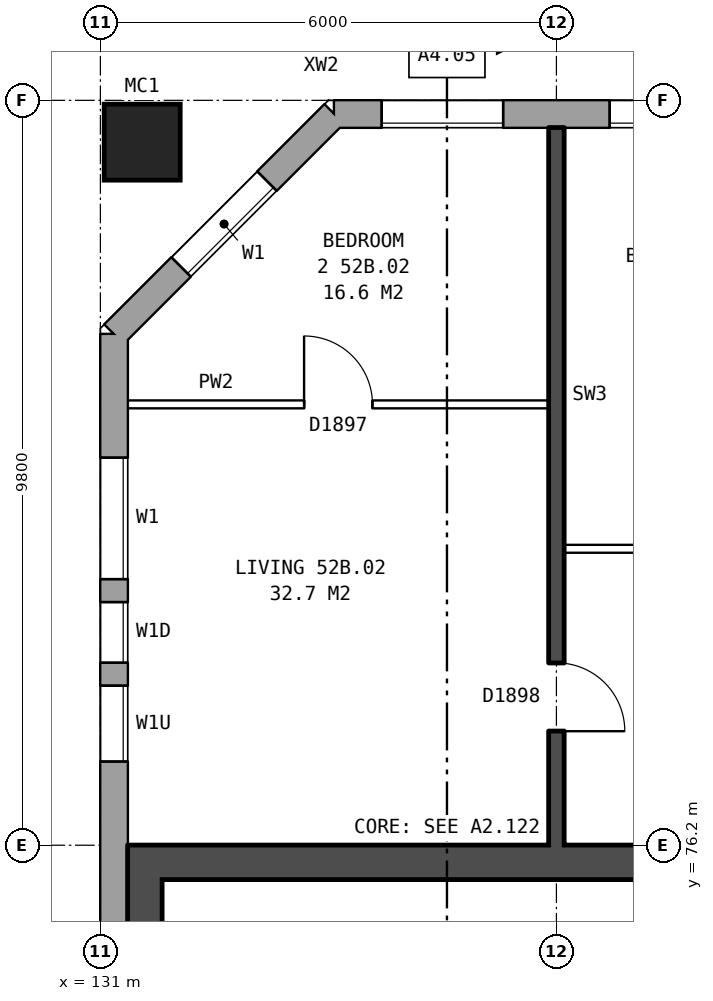
"""IFC4 building model, lengths in metres.
Left out: names, types, materials, properties, quantities, classifications, styles, units other than length and angle.
Written with IfcOpenShell. Run it as: python <this file> out.ifc"""

import sys

from ifc_helpers import new_model, si_unit, direction, frame, frame_2d, origin, origin_2d, place, context, subcontext, project, spatial, rectangle, hollow_rectangle, extrude, element, fill, save


model = new_model("IFC4")
c1 = context("Model", 3, precision=1e-05, world=origin(), true_north=direction((0.0, 1.0)))
c2 = subcontext(c1, "Body", "Model", "MODEL_VIEW")
j1 = project(units=[si_unit("LENGTHUNIT", "METRE"), si_unit("PLANEANGLEUNIT", "RADIAN")], contexts=[c1])
p1 = place(None, origin())
s1 = spatial("IfcSite", under=j1, at=p1, CompositionType="ELEMENT")
p2 = place(p1, origin())
s2 = spatial("IfcBuilding", under=s1, at=p2, CompositionType="ELEMENT")
p3 = place(p2, frame((0.0, 0.0, 185.1)))
s3 = spatial("IfcBuildingStorey", under=s2, at=p3, CompositionType="ELEMENT", Elevation=185.1)
p4 = place(p3, frame((131.55, 85.45, 0.0), z_axis=(0.0, 0.0, 1.0), x_axis=(1.0, 0.0, 0.0)))
e1 = element("IfcColumn", 1, at=p4, inside=s3, PredefinedType="COLUMN", context=c2, shape_type="SweptSolid", body=[
    extrude(hollow_rectangle(XDim=1.0, YDim=1.0, WallThickness=0.055, at=origin_2d()), origin(), (0.0, 0.0, 1.0), 3.1),
])
p5 = place(p3, frame((167.175, 85.82, 0.0), z_axis=(0.0, 0.0, 1.0), x_axis=(-1.0, 0.0, 0.0)))
e2 = element("IfcWall", 2, at=p5, inside=s3, PredefinedType="STANDARD", context=c2, shape_type="SweptSolid", body=[
    extrude(rectangle(XDim=33.101, YDim=0.36, at=frame_2d((16.55, 0.0))), origin(), (0.0, 0.0, 1.0), 2.85),
])
p6 = place(p5, frame((0.875, 0.0, 0.8)))
e3 = element("IfcOpeningElement", 3, at=p6, cuts=e2, PredefinedType="OPENING", context=c2, shape_type="SweptSolid", body=[
    extrude(rectangle(XDim=1.6, YDim=1.8, at=frame_2d((0.8, 0.9))), frame((0.0, 0.19, 0.0), z_axis=(0.0, -1.0, 0.0), x_axis=(1.0, 0.0, 0.0)), (0.0, 0.0, 1.0), 0.38),
])
p7 = place(p5, frame((3.875, 0.0, 0.8)))
e4 = element("IfcOpeningElement", 4, at=p7, cuts=e2, PredefinedType="OPENING", context=c2, shape_type="SweptSolid", body=[
    extrude(rectangle(XDim=1.6, YDim=1.8, at=frame_2d((0.8, 0.9))), frame((0.0, 0.19, 0.0), z_axis=(0.0, -1.0, 0.0), x_axis=(1.0, 0.0, 0.0)), (0.0, 0.0, 1.0), 0.38),
])
p8 = place(p5, frame((6.875, 0.0, 0.8)))
e5 = element("IfcOpeningElement", 5, at=p8, cuts=e2, PredefinedType="OPENING", context=c2, shape_type="SweptSolid", body=[
    extrude(rectangle(XDim=1.6, YDim=1.8, at=frame_2d((0.8, 0.9))), frame((0.0, 0.19, 0.0), z_axis=(0.0, -1.0, 0.0), x_axis=(1.0, 0.0, 0.0)), (0.0, 0.0, 1.0), 0.38),
])
p9 = place(p5, frame((8.775, 0.0, 1.4)))
e6 = element("IfcOpeningElement", 6, at=p9, cuts=e2, PredefinedType="OPENING", context=c2, shape_type="SweptSolid", body=[
    extrude(rectangle(XDim=0.8, YDim=1.2, at=frame_2d((0.4, 0.6))), frame((0.0, 0.19, 0.0), z_axis=(0.0, -1.0, 0.0), x_axis=(1.0, 0.0, 0.0)), (0.0, 0.0, 1.0), 0.38),
])
p10 = place(p5, frame((12.875, 0.0, 0.8)))
e7 = element("IfcOpeningElement", 7, at=p10, cuts=e2, PredefinedType="OPENING", context=c2, shape_type="SweptSolid", body=[
    extrude(rectangle(XDim=1.6, YDim=1.8, at=frame_2d((0.8, 0.9))), frame((0.0, 0.19, 0.0), z_axis=(0.0, -1.0, 0.0), x_axis=(1.0, 0.0, 0.0)), (0.0, 0.0, 1.0), 0.38),
])
p11 = place(p5, frame((15.875, 0.0, 0.8)))
e8 = element("IfcOpeningElement", 8, at=p11, cuts=e2, PredefinedType="OPENING", context=c2, shape_type="SweptSolid", body=[
    extrude(rectangle(XDim=1.6, YDim=1.8, at=frame_2d((0.8, 0.9))), frame((0.0, 0.19, 0.0), z_axis=(0.0, -1.0, 0.0), x_axis=(1.0, 0.0, 0.0)), (0.0, 0.0, 1.0), 0.38),
])
p12 = place(p5, frame((18.875, 0.0, 0.8)))
e9 = element("IfcOpeningElement", 9, at=p12, cuts=e2, PredefinedType="OPENING", context=c2, shape_type="SweptSolid", body=[
    extrude(rectangle(XDim=1.6, YDim=1.8, at=frame_2d((0.8, 0.9))), frame((0.0, 0.19, 0.0), z_axis=(0.0, -1.0, 0.0), x_axis=(1.0, 0.0, 0.0)), (0.0, 0.0, 1.0), 0.38),
])
p13 = place(p5, frame((21.325, 0.0, 0.25)))
e10 = element("IfcOpeningElement", 10, at=p13, cuts=e2, PredefinedType="OPENING", context=c2, shape_type="SweptSolid", body=[
    extrude(rectangle(XDim=0.6, YDim=1.8, at=frame_2d((0.3, 0.9))), frame((0.0, 0.19, 0.0), z_axis=(0.0, -1.0, 0.0), x_axis=(1.0, 0.0, 0.0)), (0.0, 0.0, 1.0), 0.38),
])
p14 = place(p5, frame((24.875, 0.0, 0.8)))
e11 = element("IfcOpeningElement", 11, at=p14, cuts=e2, PredefinedType="OPENING", context=c2, shape_type="SweptSolid", body=[
    extrude(rectangle(XDim=1.6, YDim=1.8, at=frame_2d((0.8, 0.9))), frame((0.0, 0.19, 0.0), z_axis=(0.0, -1.0, 0.0), x_axis=(1.0, 0.0, 0.0)), (0.0, 0.0, 1.0), 0.38),
])
p15 = place(p5, frame((27.875, 0.0, 0.8)))
e12 = element("IfcOpeningElement", 12, at=p15, cuts=e2, PredefinedType="OPENING", context=c2, shape_type="SweptSolid", body=[
    extrude(rectangle(XDim=1.6, YDim=1.8, at=frame_2d((0.8, 0.9))), frame((0.0, 0.19, 0.0), z_axis=(0.0, -1.0, 0.0), x_axis=(1.0, 0.0, 0.0)), (0.0, 0.0, 1.0), 0.38),
])
p16 = place(p5, frame((30.875, 0.0, 0.8)))
e13 = element("IfcOpeningElement", 13, at=p16, cuts=e2, PredefinedType="OPENING", context=c2, shape_type="SweptSolid", body=[
    extrude(rectangle(XDim=1.6, YDim=1.8, at=frame_2d((0.8, 0.9))), frame((0.0, 0.19, 0.0), z_axis=(0.0, -1.0, 0.0), x_axis=(1.0, 0.0, 0.0)), (0.0, 0.0, 1.0), 0.38),
])
p17 = place(p5, frame((11.125, 0.0, 0.8)))
e14 = element("IfcOpeningElement", 14, at=p17, cuts=e2, PredefinedType="OPENING", context=c2, shape_type="SweptSolid", body=[
    extrude(rectangle(XDim=0.8, YDim=1.2, at=frame_2d((0.4, 0.6))), frame((0.0, 0.19, 0.0), z_axis=(0.0, -1.0, 0.0), x_axis=(1.0, 0.0, 0.0)), (0.0, 0.0, 1.0), 0.38),
])
p18 = place(p5, frame((22.225, 0.0, 0.15)))
e15 = element("IfcOpeningElement", 15, at=p18, cuts=e2, PredefinedType="OPENING", context=c2, shape_type="SweptSolid", body=[
    extrude(rectangle(XDim=0.6, YDim=0.9, at=frame_2d((0.3, 0.45))), frame((0.0, 0.19, 0.0), z_axis=(0.0, -1.0, 0.0), x_axis=(1.0, 0.0, 0.0)), (0.0, 0.0, 1.0), 0.38),
])
p19 = place(p5, frame((23.325, 0.0, 1.65)))
e16 = element("IfcOpeningElement", 16, at=p19, cuts=e2, PredefinedType="OPENING", context=c2, shape_type="SweptSolid", body=[
    extrude(rectangle(XDim=0.6, YDim=0.9, at=frame_2d((0.3, 0.45))), frame((0.0, 0.19, 0.0), z_axis=(0.0, -1.0, 0.0), x_axis=(1.0, 0.0, 0.0)), (0.0, 0.0, 1.0), 0.38),
])
p20 = place(p3, frame((134.075, 85.82, 0.0), z_axis=(0.0, 0.0, 1.0), x_axis=(-0.707106781187, -0.707106781187, 0.0)))
e17 = element("IfcWall", 17, at=p20, inside=s3, PredefinedType="STANDARD", context=c2, shape_type="SweptSolid", body=[
    extrude(rectangle(XDim=4.094, YDim=0.36, at=frame_2d((2.047, 0.0))), origin(), (0.0, 0.0, 1.0), 2.85),
])
p21 = place(p20, frame((1.247, 0.0, 0.8)))
e18 = element("IfcOpeningElement", 18, at=p21, cuts=e17, PredefinedType="OPENING", context=c2, shape_type="SweptSolid", body=[
    extrude(rectangle(XDim=1.6, YDim=1.8, at=frame_2d((0.8, 0.9))), frame((0.0, 0.19, 0.0), z_axis=(0.0, -1.0, 0.0), x_axis=(1.0, 0.0, 0.0)), (0.0, 0.0, 1.0), 0.38),
])
p22 = place(p3, frame((131.18, 82.925, 0.0), z_axis=(0.0, 0.0, 1.0), x_axis=(0.0, -1.0, 0.0)))
e19 = element("IfcWall", 19, at=p22, inside=s3, PredefinedType="STANDARD", context=c2, shape_type="SweptSolid", body=[
    extrude(rectangle(XDim=25.851, YDim=0.36, at=frame_2d((12.925, 0.0))), origin(), (0.0, 0.0, 1.0), 2.85),
])
p23 = place(p22, frame((1.625, 0.0, 0.8)))
e20 = element("IfcOpeningElement", 20, at=p23, cuts=e19, PredefinedType="OPENING", context=c2, shape_type="SweptSolid", body=[
    extrude(rectangle(XDim=1.6, YDim=1.8, at=frame_2d((0.8, 0.9))), frame((0.0, 0.19, 0.0), z_axis=(0.0, -1.0, 0.0), x_axis=(1.0, 0.0, 0.0)), (0.0, 0.0, 1.0), 0.38),
])
p24 = place(p22, frame((3.525, 0.0, 0.8)))
e21 = element("IfcOpeningElement", 21, at=p24, cuts=e19, PredefinedType="OPENING", context=c2, shape_type="SweptSolid", body=[
    extrude(rectangle(XDim=0.8, YDim=1.8, at=frame_2d((0.4, 0.9))), frame((0.0, 0.19, 0.0), z_axis=(0.0, -1.0, 0.0), x_axis=(1.0, 0.0, 0.0)), (0.0, 0.0, 1.0), 0.38),
])
p25 = place(p22, frame((20.2, 0.0, 0.8)))
e22 = element("IfcOpeningElement", 22, at=p25, cuts=e19, PredefinedType="OPENING", context=c2, shape_type="SweptSolid", body=[
    extrude(rectangle(XDim=0.6, YDim=0.9, at=frame_2d((0.3, 0.45))), frame((0.0, 0.19, 0.0), z_axis=(0.0, -1.0, 0.0), x_axis=(1.0, 0.0, 0.0)), (0.0, 0.0, 1.0), 0.38),
])
p26 = place(p22, frame((22.625, 0.0, 0.8)))
e23 = element("IfcOpeningElement", 23, at=p26, cuts=e19, PredefinedType="OPENING", context=c2, shape_type="SweptSolid", body=[
    extrude(rectangle(XDim=1.6, YDim=1.8, at=frame_2d((0.8, 0.9))), frame((0.0, 0.19, 0.0), z_axis=(0.0, -1.0, 0.0), x_axis=(1.0, 0.0, 0.0)), (0.0, 0.0, 1.0), 0.38),
])
p27 = place(p22, frame((4.625, 0.0, 0.8)))
e24 = element("IfcOpeningElement", 24, at=p27, cuts=e19, PredefinedType="OPENING", context=c2, shape_type="SweptSolid", body=[
    extrude(rectangle(XDim=1.0, YDim=0.9, at=frame_2d((0.5, 0.45))), frame((0.0, 0.19, 0.0), z_axis=(0.0, -1.0, 0.0), x_axis=(1.0, 0.0, 0.0)), (0.0, 0.0, 1.0), 0.38),
])
p28 = place(p22, frame((21.1, 0.0, 0.8)))
e25 = element("IfcOpeningElement", 25, at=p28, cuts=e19, PredefinedType="OPENING", context=c2, shape_type="SweptSolid", body=[
    extrude(rectangle(XDim=1.2, YDim=1.5, at=frame_2d((0.6, 0.75))), frame((0.0, 0.19, 0.0), z_axis=(0.0, -1.0, 0.0), x_axis=(1.0, 0.0, 0.0)), (0.0, 0.0, 1.0), 0.38),
])
p29 = place(p3, frame((131.585, 63.8, 0.0), z_axis=(0.0, 0.0, 1.0), x_axis=(0.0, 1.0, 0.0)))
e26 = element("IfcWall", 26, at=p29, inside=s3, PredefinedType="SHEAR", context=c2, shape_type="SweptSolid", body=[
    extrude(rectangle(XDim=12.4, YDim=0.45, at=frame_2d((6.2, 0.0))), origin(), (0.0, 0.0, 1.0), 2.85),
])
p30 = place(p3, frame((139.31, 75.975, 0.0), z_axis=(0.0, 0.0, 1.0), x_axis=(-1.0, 0.0, 0.0)))
e27 = element("IfcWall", 27, at=p30, inside=s3, PredefinedType="SHEAR", context=c2, shape_type="SweptSolid", body=[
    extrude(rectangle(XDim=7.5, YDim=0.45, at=frame_2d((3.75, 0.0))), origin(), (0.0, 0.0, 1.0), 2.85),
])
p31 = place(p3, frame((137.1, 80.1, 0.0), z_axis=(0.0, 0.0, 1.0), x_axis=(1.0, 0.0, 0.0)))
e28 = element("IfcWall", 28, at=p31, inside=s3, PredefinedType="PARTITIONING", context=c2, shape_type="SweptSolid", body=[
    extrude(rectangle(XDim=5.8, YDim=0.1, at=frame_2d((2.9, 0.0))), origin(), (0.0, 0.0, 1.0), 2.85),
])
p32 = place(p31, frame((1.3, 0.0, 0.0)))
e29 = element("IfcOpeningElement", 29, at=p32, cuts=e28, PredefinedType="OPENING", context=c2, shape_type="SweptSolid", body=[
    extrude(rectangle(XDim=0.9, YDim=2.1, at=frame_2d((0.45, 1.05))), frame((0.0, 0.06, 0.0), z_axis=(0.0, -1.0, 0.0), x_axis=(1.0, 0.0, 0.0)), (0.0, 0.0, 1.0), 0.12),
])
p33 = place(p31, frame((4.2, 0.0, 0.0)))
e30 = element("IfcOpeningElement", 30, at=p33, cuts=e28, PredefinedType="OPENING", context=c2, shape_type="SweptSolid", body=[
    extrude(rectangle(XDim=0.9, YDim=2.1, at=frame_2d((0.45, 1.05))), frame((0.0, 0.06, 0.0), z_axis=(0.0, -1.0, 0.0), x_axis=(1.0, 0.0, 0.0)), (0.0, 0.0, 1.0), 0.12),
])
p34 = place(p3, frame((131.36, 82.0, 0.0), z_axis=(0.0, 0.0, 1.0), x_axis=(1.0, 0.0, 0.0)))
e31 = element("IfcWall", 31, at=p34, inside=s3, PredefinedType="PARTITIONING", context=c2, shape_type="SweptSolid", body=[
    extrude(rectangle(XDim=5.54, YDim=0.1, at=frame_2d((2.77, 0.0))), origin(), (0.0, 0.0, 1.0), 2.85),
])
p35 = place(p34, frame((2.32, 0.0, 0.0)))
e32 = element("IfcOpeningElement", 32, at=p35, cuts=e31, PredefinedType="OPENING", context=c2, shape_type="SweptSolid", body=[
    extrude(rectangle(XDim=0.9, YDim=2.1, at=frame_2d((0.45, 1.05))), frame((0.0, 0.06, 0.0), z_axis=(0.0, -1.0, 0.0), x_axis=(1.0, 0.0, 0.0)), (0.0, 0.0, 1.0), 0.12),
])
p36 = place(p3, frame((137.0, 76.2, 0.0), z_axis=(0.0, 0.0, 1.0), x_axis=(0.0, 1.0, 0.0)))
e33 = element("IfcWall", 33, at=p36, inside=s3, PredefinedType="SOLIDWALL", context=c2, shape_type="SweptSolid", body=[
    extrude(rectangle(XDim=9.44, YDim=0.2, at=frame_2d((4.72, 0.0))), origin(), (0.0, 0.0, 1.0), 2.85),
])
p37 = place(p36, frame((1.5, 0.0, 0.0)))
e34 = element("IfcOpeningElement", 34, at=p37, cuts=e33, PredefinedType="OPENING", context=c2, shape_type="SweptSolid", body=[
    extrude(rectangle(XDim=0.9, YDim=2.1, at=frame_2d((0.45, 1.05))), frame((0.0, 0.11, 0.0), z_axis=(0.0, -1.0, 0.0), x_axis=(1.0, 0.0, 0.0)), (0.0, 0.0, 1.0), 0.22),
])
p38 = place(p15, origin())
e35 = element("IfcWindow", 35, at=p38, inside=s3, PartitioningType="SINGLE_PANEL", PredefinedType="WINDOW", context=c2, shape_type="SweptSolid", body=[
    extrude(rectangle(XDim=1.6, YDim=1.8, at=frame_2d((0.8, 0.9))), frame((0.0, 0.15, 0.0), z_axis=(0.0, -1.0, 0.0), x_axis=(1.0, 0.0, 0.0)), (0.0, 0.0, 1.0), 0.06),
])
fill(e12, e35)
p39 = place(p16, origin())
e36 = element("IfcWindow", 36, at=p39, inside=s3, PartitioningType="SINGLE_PANEL", PredefinedType="WINDOW", context=c2, shape_type="SweptSolid", body=[
    extrude(rectangle(XDim=1.6, YDim=1.8, at=frame_2d((0.8, 0.9))), frame((0.0, 0.15, 0.0), z_axis=(0.0, -1.0, 0.0), x_axis=(1.0, 0.0, 0.0)), (0.0, 0.0, 1.0), 0.06),
])
fill(e13, e36)
p40 = place(p21, origin())
e37 = element("IfcWindow", 37, at=p40, inside=s3, PartitioningType="SINGLE_PANEL", PredefinedType="WINDOW", context=c2, shape_type="SweptSolid", body=[
    extrude(rectangle(XDim=1.6, YDim=1.8, at=frame_2d((0.8, 0.9))), frame((0.0, 0.15, 0.0), z_axis=(0.0, -1.0, 0.0), x_axis=(1.0, 0.0, 0.0)), (0.0, 0.0, 1.0), 0.06),
])
fill(e18, e37)
p41 = place(p23, origin())
e38 = element("IfcWindow", 38, at=p41, inside=s3, PartitioningType="SINGLE_PANEL", PredefinedType="WINDOW", context=c2, shape_type="SweptSolid", body=[
    extrude(rectangle(XDim=1.6, YDim=1.8, at=frame_2d((0.8, 0.9))), frame((0.0, 0.15, 0.0), z_axis=(0.0, -1.0, 0.0), x_axis=(1.0, 0.0, 0.0)), (0.0, 0.0, 1.0), 0.06),
])
fill(e20, e38)
p42 = place(p24, origin())
e39 = element("IfcWindow", 39, at=p42, inside=s3, PartitioningType="SINGLE_PANEL", PredefinedType="WINDOW", context=c2, shape_type="SweptSolid", body=[
    extrude(rectangle(XDim=0.8, YDim=1.8, at=frame_2d((0.4, 0.9))), frame((0.0, 0.15, 0.0), z_axis=(0.0, -1.0, 0.0), x_axis=(1.0, 0.0, 0.0)), (0.0, 0.0, 1.0), 0.06),
])
fill(e21, e39)
p43 = place(p35, origin())
e40 = element("IfcDoor", 40, at=p43, inside=s3, OperationType="SINGLE_SWING_LEFT", PredefinedType="DOOR", context=c2, shape_type="SweptSolid", body=[
    extrude(rectangle(XDim=0.9, YDim=2.1, at=frame_2d((0.45, 1.05))), frame((0.0, 0.025, 0.0), z_axis=(0.0, -1.0, 0.0), x_axis=(1.0, 0.0, 0.0)), (0.0, 0.0, 1.0), 0.05),
])
fill(e32, e40)
p44 = place(p37, frame((0.9, 0.0, 0.0), z_axis=(0.0, 0.0, 1.0), x_axis=(-1.0, 0.0, 0.0)))
e41 = element("IfcDoor", 41, at=p44, inside=s3, OperationType="SINGLE_SWING_RIGHT", PredefinedType="DOOR", context=c2, shape_type="SweptSolid", body=[
    extrude(rectangle(XDim=0.9, YDim=2.1, at=frame_2d((0.45, 1.05))), frame((0.0, 0.025, 0.0), z_axis=(0.0, -1.0, 0.0), x_axis=(1.0, 0.0, 0.0)), (0.0, 0.0, 1.0), 0.05),
])
fill(e34, e41)
p45 = place(p27, origin())
e42 = element("IfcWindow", 42, at=p45, inside=s3, PartitioningType="SINGLE_PANEL", PredefinedType="WINDOW", context=c2, shape_type="SweptSolid", body=[
    extrude(rectangle(XDim=1.0, YDim=0.9, at=frame_2d((0.5, 0.45))), frame((0.0, 0.15, 0.0), z_axis=(0.0, -1.0, 0.0), x_axis=(1.0, 0.0, 0.0)), (0.0, 0.0, 1.0), 0.06),
])
fill(e24, e42)
save(model, sys.argv[1])
